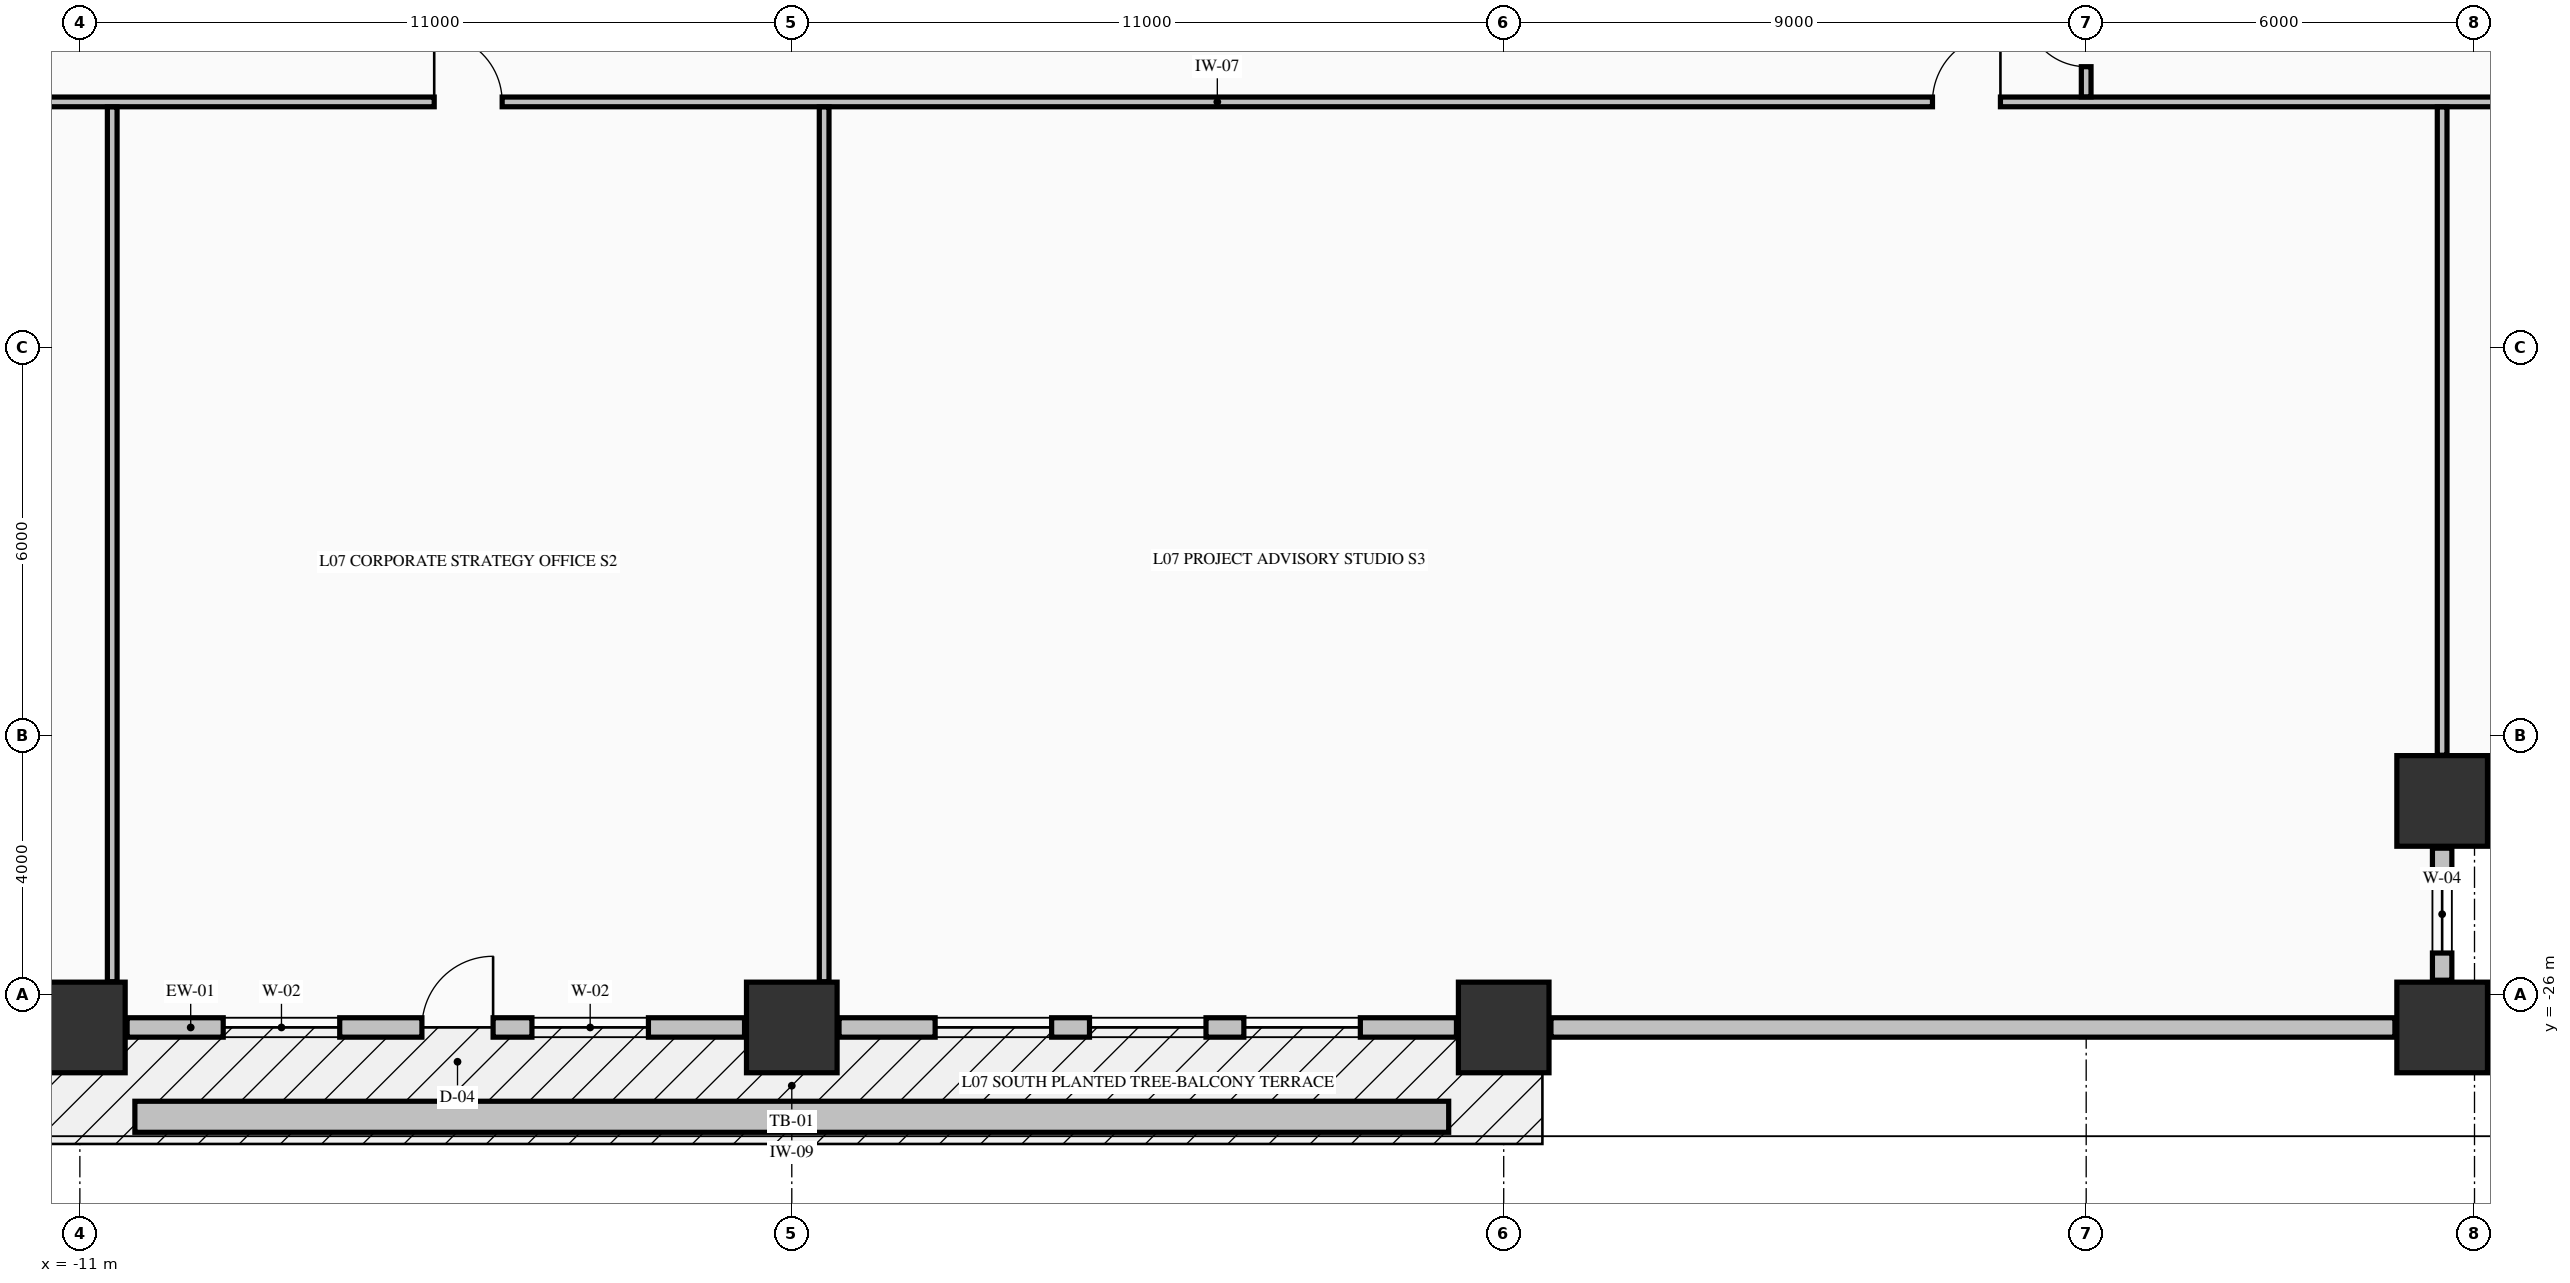
"""IFC4 building model, lengths in metres.
Left out: names, types, materials, properties, quantities, classifications, styles, units other than length and angle.
Written with IfcOpenShell. Run it as: python <this file> out.ifc"""

import sys

from ifc_helpers import new_model, si_unit, direction, frame, frame_2d, origin, origin_2d, place, context, subcontext, project, spatial, rectangle, extrude, element, fill, save


model = new_model("IFC4")
c1 = context("Model", 3, precision=1e-05, world=origin(), true_north=direction((0.0, 1.0)))
c2 = subcontext(c1, "Body", "Model", "MODEL_VIEW")
j1 = project(units=[si_unit("LENGTHUNIT", "METRE"), si_unit("PLANEANGLEUNIT", "RADIAN")], contexts=[c1])
p1 = place(None, origin())
s1 = spatial("IfcSite", under=j1, at=p1, CompositionType="ELEMENT")
p2 = place(p1, origin())
s2 = spatial("IfcBuilding", under=s1, at=p2, CompositionType="ELEMENT")
p3 = place(p2, frame((0.0, 0.0, 34.34)))
s3 = spatial("IfcBuildingStorey", under=s2, at=p3, CompositionType="ELEMENT", Elevation=34.34)
for number, where, z_axis, x_axis in (
    (1, (-11.0, -26.5, -0.3), (0.0, 0.0, 1.0), (1.0, 0.0, 0.0)),
    (2, (0.0, -26.5, -0.3), (0.0, 0.0, 1.0), (1.0, 0.0, 0.0)),
    (3, (11.0, -26.5, -0.3), (0.0, 0.0, 1.0), (1.0, 0.0, 0.0)),
    (4, (25.5, -26.5, -0.3), (0.0, 0.0, 1.0), (1.0, 0.0, 0.0)),
    (5, (25.5, -23.0, -0.3), (0.0, 0.0, 1.0), (1.0, 0.0, 0.0)),
):
    element("IfcColumn", number, at=place(p3, frame(where, z_axis=z_axis, x_axis=x_axis)), inside=s3, PredefinedType="COLUMN", context=c2, shape_type="SweptSolid", body=[
        extrude(rectangle(XDim=1.4, YDim=1.4, at=origin_2d()), origin(), (0.0, 0.0, 1.0), 3.62),
    ])
p4 = place(p3, frame((25.5, -25.77, 0.0), z_axis=(0.0, 0.0, 1.0), x_axis=(0.0, 1.0, 0.0)))
e6 = element("IfcWall", 6, at=p4, inside=s3, PredefinedType="STANDARD", context=c2, shape_type="SweptSolid", body=[
    extrude(rectangle(XDim=2.04, YDim=0.3, at=frame_2d((1.02, 0.0))), origin(), (0.0, 0.0, 1.0), 2.712),
])
p5 = place(p4, frame((0.42, 0.0, 0.82)))
e7 = element("IfcOpeningElement", 7, at=p5, cuts=e6, PredefinedType="OPENING", context=c2, shape_type="SweptSolid", body=[
    extrude(rectangle(XDim=1.2, YDim=1.65, at=frame_2d((0.6, 0.825))), frame((0.0, 0.16, 0.0), z_axis=(0.0, -1.0, 0.0), x_axis=(1.0, 0.0, 0.0)), (0.0, 0.0, 1.0), 0.32),
])
p6 = place(p3, frame((26.23, -23.0, 0.0), z_axis=(0.0, 0.0, 1.0), x_axis=(1.0, 0.0, 0.0)))
e8 = element("IfcWall", 8, at=p6, inside=s3, PredefinedType="STANDARD", context=c2, shape_type="SweptSolid", body=[
    extrude(rectangle(XDim=2.04, YDim=0.3, at=frame_2d((1.02, 0.0))), origin(), (0.0, 0.0, 1.0), 2.712),
])
p7 = place(p6, frame((0.42, 0.0, 0.82)))
e9 = element("IfcOpeningElement", 9, at=p7, cuts=e8, PredefinedType="OPENING", context=c2, shape_type="SweptSolid", body=[
    extrude(rectangle(XDim=1.2, YDim=1.65, at=frame_2d((0.6, 0.825))), frame((0.0, 0.16, 0.0), z_axis=(0.0, -1.0, 0.0), x_axis=(1.0, 0.0, 0.0)), (0.0, 0.0, 1.0), 0.32),
])
p8 = place(p3, frame((-10.27, -26.5, 0.0), z_axis=(0.0, 0.0, 1.0), x_axis=(1.0, 0.0, 0.0)))
e10 = element("IfcWall", 10, at=p8, inside=s3, PredefinedType="STANDARD", context=c2, shape_type="SweptSolid", body=[
    extrude(rectangle(XDim=9.54, YDim=0.3, at=frame_2d((4.77, 0.0))), origin(), (0.0, 0.0, 1.0), 2.712),
])
p9 = place(p8, frame((4.555, 0.0, 0.0)))
e11 = element("IfcOpeningElement", 11, at=p9, cuts=e10, PredefinedType="OPENING", context=c2, shape_type="SweptSolid", body=[
    extrude(rectangle(XDim=1.1, YDim=2.15, at=frame_2d((0.55, 1.075))), frame((0.0, 0.16, 0.0), z_axis=(0.0, -1.0, 0.0), x_axis=(1.0, 0.0, 0.0)), (0.0, 0.0, 1.0), 0.32),
])
p10 = place(p8, frame((1.485, 0.0, 0.78)))
e12 = element("IfcOpeningElement", 12, at=p10, cuts=e10, PredefinedType="OPENING", context=c2, shape_type="SweptSolid", body=[
    extrude(rectangle(XDim=1.8, YDim=1.72, at=frame_2d((0.9, 0.86))), frame((0.0, 0.16, 0.0), z_axis=(0.0, -1.0, 0.0), x_axis=(1.0, 0.0, 0.0)), (0.0, 0.0, 1.0), 0.32),
])
p11 = place(p8, frame((6.255, 0.0, 0.78)))
e13 = element("IfcOpeningElement", 13, at=p11, cuts=e10, PredefinedType="OPENING", context=c2, shape_type="SweptSolid", body=[
    extrude(rectangle(XDim=1.8, YDim=1.72, at=frame_2d((0.9, 0.86))), frame((0.0, 0.16, 0.0), z_axis=(0.0, -1.0, 0.0), x_axis=(1.0, 0.0, 0.0)), (0.0, 0.0, 1.0), 0.32),
])
p12 = place(p3, frame((0.73, -26.5, 0.0), z_axis=(0.0, 0.0, 1.0), x_axis=(1.0, 0.0, 0.0)))
e14 = element("IfcWall", 14, at=p12, inside=s3, PredefinedType="STANDARD", context=c2, shape_type="SweptSolid", body=[
    extrude(rectangle(XDim=9.54, YDim=0.3, at=frame_2d((4.77, 0.0))), origin(), (0.0, 0.0, 1.0), 2.712),
])
p13 = place(p12, frame((1.485, 0.0, 0.78)))
e15 = element("IfcOpeningElement", 15, at=p13, cuts=e14, PredefinedType="OPENING", context=c2, shape_type="SweptSolid", body=[
    extrude(rectangle(XDim=1.8, YDim=1.72, at=frame_2d((0.9, 0.86))), frame((0.0, 0.16, 0.0), z_axis=(0.0, -1.0, 0.0), x_axis=(1.0, 0.0, 0.0)), (0.0, 0.0, 1.0), 0.32),
])
p14 = place(p12, frame((3.87, 0.0, 0.78)))
e16 = element("IfcOpeningElement", 16, at=p14, cuts=e14, PredefinedType="OPENING", context=c2, shape_type="SweptSolid", body=[
    extrude(rectangle(XDim=1.8, YDim=1.72, at=frame_2d((0.9, 0.86))), frame((0.0, 0.16, 0.0), z_axis=(0.0, -1.0, 0.0), x_axis=(1.0, 0.0, 0.0)), (0.0, 0.0, 1.0), 0.32),
])
p15 = place(p12, frame((6.255, 0.0, 0.78)))
e17 = element("IfcOpeningElement", 17, at=p15, cuts=e14, PredefinedType="OPENING", context=c2, shape_type="SweptSolid", body=[
    extrude(rectangle(XDim=1.8, YDim=1.72, at=frame_2d((0.9, 0.86))), frame((0.0, 0.16, 0.0), z_axis=(0.0, -1.0, 0.0), x_axis=(1.0, 0.0, 0.0)), (0.0, 0.0, 1.0), 0.32),
])
p16 = place(p3, frame((11.73, -26.5, 0.0), z_axis=(0.0, 0.0, 1.0), x_axis=(1.0, 0.0, 0.0)))
e18 = element("IfcWall", 18, at=p16, inside=s3, PredefinedType="STANDARD", context=c2, shape_type="SweptSolid", body=[
    extrude(rectangle(XDim=13.04, YDim=0.3, at=frame_2d((6.52, 0.0))), origin(), (0.0, 0.0, 1.0), 2.712),
])
p17 = place(p3, frame((-23.835, -12.2, 0.0), z_axis=(0.0, 0.0, 1.0), x_axis=(1.0, 0.0, 0.0)))
e19 = element("IfcWall", 19, at=p17, inside=s3, PredefinedType="PARTITIONING", context=c2, shape_type="SweptSolid", body=[
    extrude(rectangle(XDim=52.67, YDim=0.15, at=frame_2d((26.335, 0.0))), origin(), (0.0, 0.0, 1.0), 3.32),
])
p18 = place(p17, frame((8.16, 0.0, 0.0)))
e20 = element("IfcOpeningElement", 20, at=p18, cuts=e19, PredefinedType="OPENING", context=c2, shape_type="SweptSolid", body=[
    extrude(rectangle(XDim=1.05, YDim=2.15, at=frame_2d((0.525, 1.075))), frame((0.0, 0.085, 0.0), z_axis=(0.0, -1.0, 0.0), x_axis=(1.0, 0.0, 0.0)), (0.0, 0.0, 1.0), 0.17),
])
p19 = place(p17, frame((18.31, 0.0, 0.0)))
e21 = element("IfcOpeningElement", 21, at=p19, cuts=e19, PredefinedType="OPENING", context=c2, shape_type="SweptSolid", body=[
    extrude(rectangle(XDim=1.05, YDim=2.15, at=frame_2d((0.525, 1.075))), frame((0.0, 0.085, 0.0), z_axis=(0.0, -1.0, 0.0), x_axis=(1.0, 0.0, 0.0)), (0.0, 0.0, 1.0), 0.17),
])
p20 = place(p17, frame((41.46, 0.0, 0.0)))
e22 = element("IfcOpeningElement", 22, at=p20, cuts=e19, PredefinedType="OPENING", context=c2, shape_type="SweptSolid", body=[
    extrude(rectangle(XDim=1.05, YDim=2.15, at=frame_2d((0.525, 1.075))), frame((0.0, 0.085, 0.0), z_axis=(0.0, -1.0, 0.0), x_axis=(1.0, 0.0, 0.0)), (0.0, 0.0, 1.0), 0.17),
])
for number, where, z_axis, x_axis in (
    (23, (-10.5, -25.794, 0.0), (0.0, 0.0, 1.0), (0.0, 1.0, 0.0)),
    (24, (0.5, -25.794, 0.0), (0.0, 0.0, 1.0), (0.0, 1.0, 0.0)),
):
    element("IfcWall", number, at=place(p3, frame(where, z_axis=z_axis, x_axis=x_axis)), inside=s3, PredefinedType="PARTITIONING", context=c2, shape_type="SweptSolid", body=[
        extrude(rectangle(XDim=13.516, YDim=0.15, at=frame_2d((6.758, 0.0))), origin(), (0.0, 0.0, 1.0), 3.32),
    ])
p21 = place(p3, frame((20.0, -12.122, 0.0), z_axis=(0.0, 0.0, 1.0), x_axis=(0.0, 1.0, 0.0)))
e25 = element("IfcWall", 25, at=p21, inside=s3, PredefinedType="PARTITIONING", context=c2, shape_type="SweptSolid", body=[
    extrude(rectangle(XDim=1.566, YDim=0.15, at=frame_2d((0.783, 0.0))), origin(), (0.0, 0.0, 1.0), 2.66),
])
p22 = place(p21, frame((0.466, 0.0, 0.0)))
e26 = element("IfcOpeningElement", 26, at=p22, cuts=e25, PredefinedType="OPENING", context=c2, shape_type="SweptSolid", body=[
    extrude(rectangle(XDim=0.95, YDim=2.15, at=frame_2d((0.475, 1.075))), frame((0.0, 0.085, 0.0), z_axis=(0.0, -1.0, 0.0), x_axis=(1.0, 0.0, 0.0)), (0.0, 0.0, 1.0), 0.17),
])
p23 = place(p3, frame((25.5, -22.294, 0.0), z_axis=(0.0, 0.0, 1.0), x_axis=(0.0, 1.0, 0.0)))
e27 = element("IfcWall", 27, at=p23, inside=s3, PredefinedType="PARTITIONING", context=c2, shape_type="SweptSolid", body=[
    extrude(rectangle(XDim=10.016, YDim=0.15, at=frame_2d((5.008, 0.0))), origin(), (0.0, 0.0, 1.0), 3.32),
])
p24 = place(p3, frame((-10.15, -27.88, -0.04), z_axis=(0.0, 0.0, 1.0), x_axis=(1.0, 0.0, 0.0)))
e28 = element("IfcWall", 28, at=p24, inside=s3, PredefinedType="PARAPET", context=c2, shape_type="SweptSolid", body=[
    extrude(rectangle(XDim=20.3, YDim=0.48, at=frame_2d((10.15, 0.0))), origin(), (0.0, 0.0, 1.0), 0.52),
])
p25 = place(p5, origin())
e29 = element("IfcWindow", 29, at=p25, inside=s3, PartitioningType="SINGLE_PANEL", PredefinedType="WINDOW", context=c2, shape_type="SweptSolid", body=[
    extrude(rectangle(XDim=1.2, YDim=1.65, at=frame_2d((0.6, 0.825))), frame((0.0, 0.03, 0.0), z_axis=(0.0, -1.0, 0.0), x_axis=(1.0, 0.0, 0.0)), (0.0, 0.0, 1.0), 0.06),
])
fill(e7, e29)
p26 = place(p9, origin())
e30 = element("IfcDoor", 30, at=p26, inside=s3, OperationType="SINGLE_SWING_RIGHT", PredefinedType="DOOR", context=c2, shape_type="SweptSolid", body=[
    extrude(rectangle(XDim=1.1, YDim=2.15, at=frame_2d((0.55, 1.075))), frame((0.0, 0.025, 0.0), z_axis=(0.0, -1.0, 0.0), x_axis=(1.0, 0.0, 0.0)), (0.0, 0.0, 1.0), 0.05),
])
fill(e11, e30)
p27 = place(p10, origin())
e31 = element("IfcWindow", 31, at=p27, inside=s3, PartitioningType="SINGLE_PANEL", PredefinedType="WINDOW", context=c2, shape_type="SweptSolid", body=[
    extrude(rectangle(XDim=1.8, YDim=1.72, at=frame_2d((0.9, 0.86))), frame((0.0, 0.03, 0.0), z_axis=(0.0, -1.0, 0.0), x_axis=(1.0, 0.0, 0.0)), (0.0, 0.0, 1.0), 0.06),
])
fill(e12, e31)
p28 = place(p11, origin())
e32 = element("IfcWindow", 32, at=p28, inside=s3, PartitioningType="SINGLE_PANEL", PredefinedType="WINDOW", context=c2, shape_type="SweptSolid", body=[
    extrude(rectangle(XDim=1.8, YDim=1.72, at=frame_2d((0.9, 0.86))), frame((0.0, 0.03, 0.0), z_axis=(0.0, -1.0, 0.0), x_axis=(1.0, 0.0, 0.0)), (0.0, 0.0, 1.0), 0.06),
])
fill(e13, e32)
p29 = place(p13, origin())
e33 = element("IfcWindow", 33, at=p29, inside=s3, PartitioningType="SINGLE_PANEL", PredefinedType="WINDOW", context=c2, shape_type="SweptSolid", body=[
    extrude(rectangle(XDim=1.8, YDim=1.72, at=frame_2d((0.9, 0.86))), frame((0.0, 0.03, 0.0), z_axis=(0.0, -1.0, 0.0), x_axis=(1.0, 0.0, 0.0)), (0.0, 0.0, 1.0), 0.06),
])
fill(e15, e33)
p30 = place(p14, origin())
e34 = element("IfcWindow", 34, at=p30, inside=s3, PartitioningType="SINGLE_PANEL", PredefinedType="WINDOW", context=c2, shape_type="SweptSolid", body=[
    extrude(rectangle(XDim=1.8, YDim=1.72, at=frame_2d((0.9, 0.86))), frame((0.0, 0.03, 0.0), z_axis=(0.0, -1.0, 0.0), x_axis=(1.0, 0.0, 0.0)), (0.0, 0.0, 1.0), 0.06),
])
fill(e16, e34)
p31 = place(p15, origin())
e35 = element("IfcWindow", 35, at=p31, inside=s3, PartitioningType="SINGLE_PANEL", PredefinedType="WINDOW", context=c2, shape_type="SweptSolid", body=[
    extrude(rectangle(XDim=1.8, YDim=1.72, at=frame_2d((0.9, 0.86))), frame((0.0, 0.03, 0.0), z_axis=(0.0, -1.0, 0.0), x_axis=(1.0, 0.0, 0.0)), (0.0, 0.0, 1.0), 0.06),
])
fill(e17, e35)
p32 = place(p19, origin())
e36 = element("IfcDoor", 36, at=p32, inside=s3, OperationType="SINGLE_SWING_LEFT", PredefinedType="DOOR", context=c2, shape_type="SweptSolid", body=[
    extrude(rectangle(XDim=1.05, YDim=2.15, at=frame_2d((0.525, 1.075))), frame((0.0, 0.025, 0.0), z_axis=(0.0, -1.0, 0.0), x_axis=(1.0, 0.0, 0.0)), (0.0, 0.0, 1.0), 0.05),
])
fill(e21, e36)
p33 = place(p20, origin())
e37 = element("IfcDoor", 37, at=p33, inside=s3, OperationType="SINGLE_SWING_RIGHT", PredefinedType="DOOR", context=c2, shape_type="SweptSolid", body=[
    extrude(rectangle(XDim=1.05, YDim=2.15, at=frame_2d((0.525, 1.075))), frame((0.0, 0.025, 0.0), z_axis=(0.0, -1.0, 0.0), x_axis=(1.0, 0.0, 0.0)), (0.0, 0.0, 1.0), 0.05),
])
fill(e22, e37)
p34 = place(p22, origin())
e38 = element("IfcDoor", 38, at=p34, inside=s3, OperationType="SINGLE_SWING_RIGHT", PredefinedType="DOOR", context=c2, shape_type="SweptSolid", body=[
    extrude(rectangle(XDim=0.95, YDim=2.15, at=frame_2d((0.475, 1.075))), frame((0.0, 0.025, 0.0), z_axis=(0.0, -1.0, 0.0), x_axis=(1.0, 0.0, 0.0)), (0.0, 0.0, 1.0), 0.05),
])
fill(e26, e38)
save(model, sys.argv[1])
